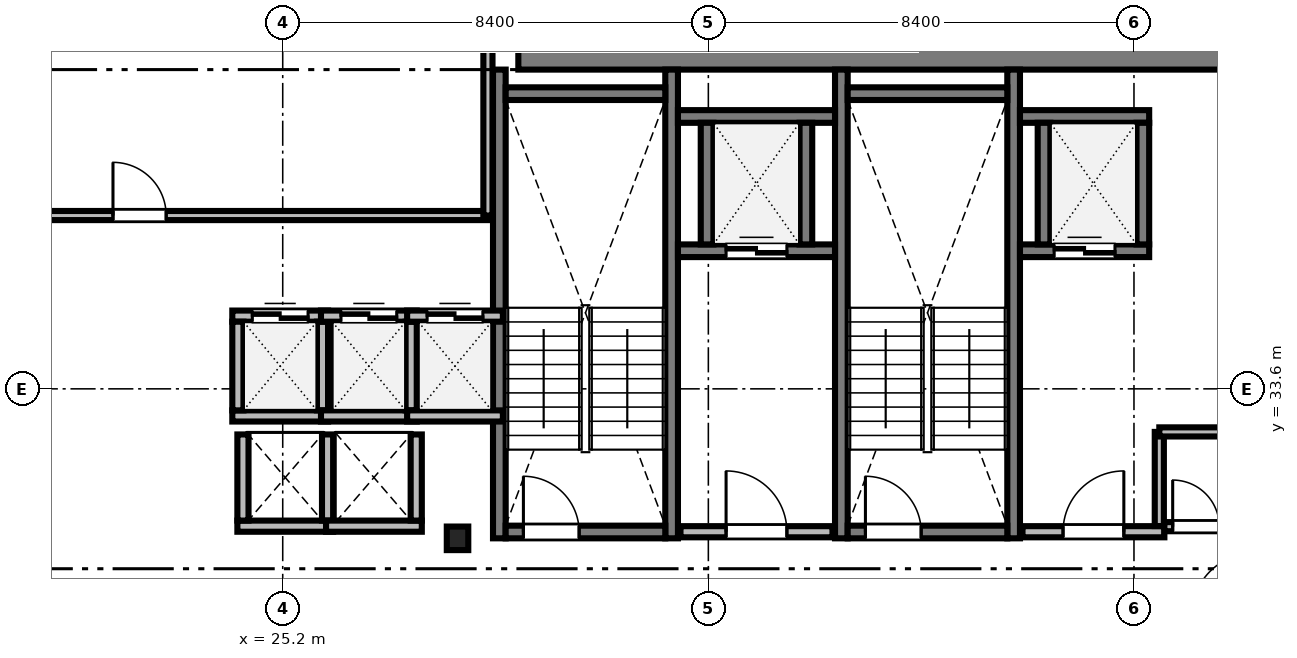
"""IFC4 building model, lengths in metres.
Left out: names, types, materials, properties, quantities, classifications, styles, units other than length and angle.
Written with IfcOpenShell. Run it as: python <this file> out.ifc"""

import sys

from ifc_helpers import new_model, si_unit, direction, frame, frame_2d, origin, origin_2d, place, context, subcontext, project, spatial, rectangle, i_section, extrude, source, transform, mapped, element, fill, save


model = new_model("IFC4")
c1 = context("Model", 3, precision=1e-05, world=origin(), true_north=direction((0.0, 1.0)))
c2 = subcontext(c1, "Body", "Model", "MODEL_VIEW")
j1 = project(units=[si_unit("LENGTHUNIT", "METRE"), si_unit("PLANEANGLEUNIT", "RADIAN")], contexts=[c1])
p1 = place(None, origin())
s1 = spatial("IfcSite", under=j1, at=p1, CompositionType="ELEMENT")
p2 = place(p1, origin())
s2 = spatial("IfcBuilding", under=s1, at=p2, CompositionType="ELEMENT")
p3 = place(p2, frame((0.0, 0.0, 159.4)))
s3 = spatial("IfcBuildingStorey", under=s2, at=p3, CompositionType="ELEMENT", Elevation=159.4)
m1 = source(origin(), c2, "Body", "SweptSolid", [
    extrude(rectangle(XDim=17.52, YDim=0.8, at=frame_2d((8.76, 0.0))), origin(), (0.0, 0.0, 1.0), 3.46),
])
p4 = place(p3, frame((29.85, 40.3, 0.0), z_axis=(0.0, 0.0, 1.0), x_axis=(1.0, 0.0, 0.0)))
e1 = element("IfcWall", 1, at=p4, inside=s3, PredefinedType="SHEAR", context=c2, shape_type="MappedRepresentation", body=[
    mapped(m1, transform((0.0, 0.0, 0.0), scale=1.0)),
])
m2 = source(origin(), c2, "Body", "SweptSolid", [
    extrude(i_section(OverallWidth=0.424, OverallDepth=0.465, WebThickness=0.035, FlangeThickness=0.056, FilletRadius=0.015, at=origin_2d()), origin(), (0.0, 0.0, 1.0), 3.46),
])
p5 = place(p3, frame((28.65, 30.65, 0.0), z_axis=(0.0, 0.0, 1.0), x_axis=(1.0, 0.0, 0.0)))
e2 = element("IfcColumn", 2, at=p5, inside=s3, PredefinedType="COLUMN", context=c2, shape_type="MappedRepresentation", body=[
    mapped(m2, transform((0.0, 0.0, 0.0), scale=1.0)),
])
m3 = source(origin(), c2, "Body", "SweptSolid", [
    extrude(rectangle(XDim=9.25, YDim=0.25, at=frame_2d((4.625, 0.0))), origin(), (0.0, 0.0, 1.0), 3.5),
])
for number, where, z_axis, x_axis in (
    (3, (29.475, 30.65, 0.0), (0.0, 0.0, 1.0), (0.0, 1.0, 0.0)),
    (4, (32.875, 30.65, 0.0), (0.0, 0.0, 1.0), (0.0, 1.0, 0.0)),
):
    element("IfcWall", number, at=place(p3, frame(where, z_axis=z_axis, x_axis=x_axis)), inside=s3, PredefinedType="SOLIDWALL", context=c2, shape_type="MappedRepresentation", body=[
        mapped(m3, transform((0.0, 0.0, 0.0), scale=1.0)),
    ])
m4 = source(origin(), c2, "Body", "SweptSolid", [
    extrude(rectangle(XDim=3.15, YDim=0.25, at=frame_2d((1.575, 0.0))), origin(), (0.0, 0.0, 1.0), 3.5),
])
p6 = place(p3, frame((29.6, 39.425, 0.0), z_axis=(0.0, 0.0, 1.0), x_axis=(1.0, 0.0, 0.0)))
e5 = element("IfcWall", 5, at=p6, inside=s3, PredefinedType="SOLIDWALL", context=c2, shape_type="MappedRepresentation", body=[
    mapped(m4, transform((0.0, 0.0, 0.0), scale=1.0)),
])
p7 = place(p3, frame((29.6, 30.775, 0.0), z_axis=(0.0, 0.0, 1.0), x_axis=(1.0, 0.0, 0.0)))
e6 = element("IfcWall", 6, at=p7, inside=s3, PredefinedType="SOLIDWALL", context=c2, shape_type="MappedRepresentation", body=[
    mapped(m4, transform((0.0, 0.0, 0.0), scale=1.0)),
])
m5 = source(origin(), c2, "Body", "SweptSolid", [
    extrude(rectangle(XDim=1.1, YDim=2.2, at=frame_2d((0.55, 1.1))), frame((0.0, 0.135, 0.0), z_axis=(0.0, -1.0, 0.0), x_axis=(1.0, 0.0, 0.0)), (0.0, 0.0, 1.0), 0.27),
])
p8 = place(p7, frame((0.35, 0.0, 0.0)))
e7 = element("IfcOpeningElement", 7, at=p8, cuts=e6, PredefinedType="OPENING", context=c2, shape_type="MappedRepresentation", body=[
    mapped(m5, transform((0.0, 0.0, 0.0), scale=1.0)),
])
for number, where, z_axis, x_axis in (
    (8, (36.225, 30.65, 0.0), (0.0, 0.0, 1.0), (0.0, 1.0, 0.0)),
    (9, (39.625, 30.65, 0.0), (0.0, 0.0, 1.0), (0.0, 1.0, 0.0)),
):
    element("IfcWall", number, at=place(p3, frame(where, z_axis=z_axis, x_axis=x_axis)), inside=s3, PredefinedType="SOLIDWALL", context=c2, shape_type="MappedRepresentation", body=[
        mapped(m3, transform((0.0, 0.0, 0.0), scale=1.0)),
    ])
p9 = place(p3, frame((36.35, 39.425, 0.0), z_axis=(0.0, 0.0, 1.0), x_axis=(1.0, 0.0, 0.0)))
e10 = element("IfcWall", 10, at=p9, inside=s3, PredefinedType="SOLIDWALL", context=c2, shape_type="MappedRepresentation", body=[
    mapped(m4, transform((0.0, 0.0, 0.0), scale=1.0)),
])
p10 = place(p3, frame((36.35, 30.775, 0.0), z_axis=(0.0, 0.0, 1.0), x_axis=(1.0, 0.0, 0.0)))
e11 = element("IfcWall", 11, at=p10, inside=s3, PredefinedType="SOLIDWALL", context=c2, shape_type="MappedRepresentation", body=[
    mapped(m4, transform((0.0, 0.0, 0.0), scale=1.0)),
])
p11 = place(p10, frame((0.35, 0.0, 0.0)))
e12 = element("IfcOpeningElement", 12, at=p11, cuts=e11, PredefinedType="OPENING", context=c2, shape_type="MappedRepresentation", body=[
    mapped(m5, transform((0.0, 0.0, 0.0), scale=1.0)),
])
m6 = source(origin(), c2, "Body", "SweptSolid", [
    extrude(rectangle(XDim=3.0, YDim=0.22, at=frame_2d((1.5, 0.0))), origin(), (0.0, 0.0, 1.0), 3.46),
])
p12 = place(p3, frame((33.05, 30.78, 0.0), z_axis=(0.0, 0.0, 1.0), x_axis=(1.0, 0.0, 0.0)))
e13 = element("IfcWall", 13, at=p12, inside=s3, PredefinedType="SOLIDWALL", context=c2, shape_type="MappedRepresentation", body=[
    mapped(m6, transform((0.0, 0.0, 0.0), scale=1.0)),
])
m7 = source(origin(), c2, "Body", "SweptSolid", [
    extrude(rectangle(XDim=1.2, YDim=2.2, at=frame_2d((0.6, 1.1))), frame((0.0, 0.12, 0.0), z_axis=(0.0, -1.0, 0.0), x_axis=(1.0, 0.0, 0.0)), (0.0, 0.0, 1.0), 0.24),
])
p13 = place(p12, frame((0.9, 0.0, 0.0)))
e14 = element("IfcOpeningElement", 14, at=p13, cuts=e13, PredefinedType="OPENING", context=c2, shape_type="MappedRepresentation", body=[
    mapped(m7, transform((0.0, 0.0, 0.0), scale=1.0)),
])
m8 = source(origin(), c2, "Body", "SweptSolid", [
    extrude(rectangle(XDim=2.8, YDim=0.22, at=frame_2d((1.4, 0.0))), origin(), (0.0, 0.0, 1.0), 3.46),
])
p14 = place(p3, frame((39.8, 30.78, 0.0), z_axis=(0.0, 0.0, 1.0), x_axis=(1.0, 0.0, 0.0)))
e15 = element("IfcWall", 15, at=p14, inside=s3, PredefinedType="SOLIDWALL", context=c2, shape_type="MappedRepresentation", body=[
    mapped(m8, transform((0.0, 0.0, 0.0), scale=1.0)),
])
p15 = place(p14, frame((0.8, 0.0, 0.0)))
e16 = element("IfcOpeningElement", 16, at=p15, cuts=e15, PredefinedType="OPENING", context=c2, shape_type="MappedRepresentation", body=[
    mapped(m7, transform((0.0, 0.0, 0.0), scale=1.0)),
])
m9 = source(origin(), c2, "Body", "SweptSolid", [
    extrude(rectangle(XDim=1.89, YDim=0.22, at=frame_2d((0.945, 0.0))), origin(), (0.0, 0.0, 1.0), 3.46),
])
p16 = place(p3, frame((24.205, 33.065, 0.0), z_axis=(0.0, 0.0, 1.0), x_axis=(1.0, 0.0, 0.0)))
e17 = element("IfcWall", 17, at=p16, inside=s3, PredefinedType="SOLIDWALL", context=c2, shape_type="MappedRepresentation", body=[
    mapped(m9, transform((0.0, 0.0, 0.0), scale=1.0)),
])
p17 = place(p3, frame((24.205, 35.035, 0.0), z_axis=(0.0, 0.0, 1.0), x_axis=(1.0, 0.0, 0.0)))
e18 = element("IfcWall", 18, at=p17, inside=s3, PredefinedType="SOLIDWALL", context=c2, shape_type="MappedRepresentation", body=[
    mapped(m9, transform((0.0, 0.0, 0.0), scale=1.0)),
])
m10 = source(origin(), c2, "Body", "SweptSolid", [
    extrude(rectangle(XDim=1.1, YDim=2.2, at=frame_2d((0.55, 1.1))), frame((0.0, 0.12, 0.0), z_axis=(0.0, -1.0, 0.0), x_axis=(1.0, 0.0, 0.0)), (0.0, 0.0, 1.0), 0.24),
])
p18 = place(p17, frame((0.395, 0.0, 0.0)))
e19 = element("IfcOpeningElement", 19, at=p18, cuts=e18, PredefinedType="OPENING", context=c2, shape_type="MappedRepresentation", body=[
    mapped(m10, transform((0.0, 0.0, 0.0), scale=1.0)),
])
m11 = source(origin(), c2, "Body", "SweptSolid", [
    extrude(rectangle(XDim=1.75, YDim=0.22, at=frame_2d((0.875, 0.0))), origin(), (0.0, 0.0, 1.0), 3.46),
])
for number, where, z_axis, x_axis in (
    (20, (24.315, 33.175, 0.0), (0.0, 0.0, 1.0), (0.0, 1.0, 0.0)),
    (21, (25.985, 33.175, 0.0), (0.0, 0.0, 1.0), (0.0, 1.0, 0.0)),
):
    element("IfcWall", number, at=place(p3, frame(where, z_axis=z_axis, x_axis=x_axis)), inside=s3, PredefinedType="SOLIDWALL", context=c2, shape_type="MappedRepresentation", body=[
        mapped(m11, transform((0.0, 0.0, 0.0), scale=1.0)),
    ])
p19 = place(p3, frame((25.955, 33.065, 0.0), z_axis=(0.0, 0.0, 1.0), x_axis=(1.0, 0.0, 0.0)))
e22 = element("IfcWall", 22, at=p19, inside=s3, PredefinedType="SOLIDWALL", context=c2, shape_type="MappedRepresentation", body=[
    mapped(m9, transform((0.0, 0.0, 0.0), scale=1.0)),
])
p20 = place(p3, frame((25.955, 35.035, 0.0), z_axis=(0.0, 0.0, 1.0), x_axis=(1.0, 0.0, 0.0)))
e23 = element("IfcWall", 23, at=p20, inside=s3, PredefinedType="SOLIDWALL", context=c2, shape_type="MappedRepresentation", body=[
    mapped(m9, transform((0.0, 0.0, 0.0), scale=1.0)),
])
p21 = place(p20, frame((0.395, 0.0, 0.0)))
e24 = element("IfcOpeningElement", 24, at=p21, cuts=e23, PredefinedType="OPENING", context=c2, shape_type="MappedRepresentation", body=[
    mapped(m10, transform((0.0, 0.0, 0.0), scale=1.0)),
])
p22 = place(p3, frame((27.735, 33.175, 0.0), z_axis=(0.0, 0.0, 1.0), x_axis=(0.0, 1.0, 0.0)))
e25 = element("IfcWall", 25, at=p22, inside=s3, PredefinedType="SOLIDWALL", context=c2, shape_type="MappedRepresentation", body=[
    mapped(m11, transform((0.0, 0.0, 0.0), scale=1.0)),
])
p23 = place(p3, frame((27.655, 33.065, 0.0), z_axis=(0.0, 0.0, 1.0), x_axis=(1.0, 0.0, 0.0)))
e26 = element("IfcWall", 26, at=p23, inside=s3, PredefinedType="SOLIDWALL", context=c2, shape_type="MappedRepresentation", body=[
    mapped(m9, transform((0.0, 0.0, 0.0), scale=1.0)),
])
p24 = place(p3, frame((27.655, 35.035, 0.0), z_axis=(0.0, 0.0, 1.0), x_axis=(1.0, 0.0, 0.0)))
e27 = element("IfcWall", 27, at=p24, inside=s3, PredefinedType="SOLIDWALL", context=c2, shape_type="MappedRepresentation", body=[
    mapped(m9, transform((0.0, 0.0, 0.0), scale=1.0)),
])
p25 = place(p24, frame((0.395, 0.0, 0.0)))
e28 = element("IfcOpeningElement", 28, at=p25, cuts=e27, PredefinedType="OPENING", context=c2, shape_type="MappedRepresentation", body=[
    mapped(m10, transform((0.0, 0.0, 0.0), scale=1.0)),
])
m12 = source(origin(), c2, "Body", "SweptSolid", [
    extrude(rectangle(XDim=3.1, YDim=0.25, at=frame_2d((1.55, 0.0))), origin(), (0.0, 0.0, 1.0), 3.46),
])
p26 = place(p3, frame((33.0, 36.325, 0.0), z_axis=(0.0, 0.0, 1.0), x_axis=(1.0, 0.0, 0.0)))
e29 = element("IfcWall", 29, at=p26, inside=s3, PredefinedType="SOLIDWALL", context=c2, shape_type="MappedRepresentation", body=[
    mapped(m12, transform((0.0, 0.0, 0.0), scale=1.0)),
])
m13 = source(origin(), c2, "Body", "SweptSolid", [
    extrude(rectangle(XDim=1.2, YDim=2.25, at=frame_2d((0.6, 1.125))), frame((0.0, 0.135, 0.0), z_axis=(0.0, -1.0, 0.0), x_axis=(1.0, 0.0, 0.0)), (0.0, 0.0, 1.0), 0.27),
])
p27 = place(p26, frame((0.95, 0.0, 0.0)))
e30 = element("IfcOpeningElement", 30, at=p27, cuts=e29, PredefinedType="OPENING", context=c2, shape_type="MappedRepresentation", body=[
    mapped(m13, transform((0.0, 0.0, 0.0), scale=1.0)),
])
p28 = place(p3, frame((33.0, 38.975, 0.0), z_axis=(0.0, 0.0, 1.0), x_axis=(1.0, 0.0, 0.0)))
e31 = element("IfcWall", 31, at=p28, inside=s3, PredefinedType="SOLIDWALL", context=c2, shape_type="MappedRepresentation", body=[
    mapped(m12, transform((0.0, 0.0, 0.0), scale=1.0)),
])
m14 = source(origin(), c2, "Body", "SweptSolid", [
    extrude(rectangle(XDim=2.4, YDim=0.25, at=frame_2d((1.2, 0.0))), origin(), (0.0, 0.0, 1.0), 3.46),
])
for number, where, z_axis, x_axis in (
    (32, (33.575, 36.45, 0.0), (0.0, 0.0, 1.0), (0.0, 1.0, 0.0)),
    (33, (35.525, 36.45, 0.0), (0.0, 0.0, 1.0), (0.0, 1.0, 0.0)),
):
    element("IfcWall", number, at=place(p3, frame(where, z_axis=z_axis, x_axis=x_axis)), inside=s3, PredefinedType="SOLIDWALL", context=c2, shape_type="MappedRepresentation", body=[
        mapped(m14, transform((0.0, 0.0, 0.0), scale=1.0)),
    ])
m15 = source(origin(), c2, "Body", "SweptSolid", [
    extrude(rectangle(XDim=2.55, YDim=0.25, at=frame_2d((1.275, 0.0))), origin(), (0.0, 0.0, 1.0), 3.46),
])
p29 = place(p3, frame((39.75, 36.325, 0.0), z_axis=(0.0, 0.0, 1.0), x_axis=(1.0, 0.0, 0.0)))
e34 = element("IfcWall", 34, at=p29, inside=s3, PredefinedType="SOLIDWALL", context=c2, shape_type="MappedRepresentation", body=[
    mapped(m15, transform((0.0, 0.0, 0.0), scale=1.0)),
])
p30 = place(p29, frame((0.675, 0.0, 0.0)))
e35 = element("IfcOpeningElement", 35, at=p30, cuts=e34, PredefinedType="OPENING", context=c2, shape_type="MappedRepresentation", body=[
    mapped(m13, transform((0.0, 0.0, 0.0), scale=1.0)),
])
p31 = place(p3, frame((39.75, 38.975, 0.0), z_axis=(0.0, 0.0, 1.0), x_axis=(1.0, 0.0, 0.0)))
e36 = element("IfcWall", 36, at=p31, inside=s3, PredefinedType="SOLIDWALL", context=c2, shape_type="MappedRepresentation", body=[
    mapped(m15, transform((0.0, 0.0, 0.0), scale=1.0)),
])
for number, where, z_axis, x_axis in (
    (37, (40.225, 36.45, 0.0), (0.0, 0.0, 1.0), (0.0, 1.0, 0.0)),
    (38, (42.175, 36.45, 0.0), (0.0, 0.0, 1.0), (0.0, 1.0, 0.0)),
):
    element("IfcWall", number, at=place(p3, frame(where, z_axis=z_axis, x_axis=x_axis)), inside=s3, PredefinedType="SOLIDWALL", context=c2, shape_type="MappedRepresentation", body=[
        mapped(m14, transform((0.0, 0.0, 0.0), scale=1.0)),
    ])
m16 = source(origin(), c2, "Body", "SweptSolid", [
    extrude(rectangle(XDim=1.89, YDim=0.22, at=frame_2d((0.945, 0.0))), origin(), (0.0, 0.0, 1.0), 3.46),
])
p32 = place(p3, frame((24.305, 30.89, 0.0), z_axis=(0.0, 0.0, 1.0), x_axis=(1.0, 0.0, 0.0)))
e39 = element("IfcWall", 39, at=p32, inside=s3, PredefinedType="SOLIDWALL", context=c2, shape_type="MappedRepresentation", body=[
    mapped(m16, transform((0.0, 0.0, 0.0), scale=1.0)),
])
m17 = source(origin(), c2, "Body", "SweptSolid", [
    extrude(rectangle(XDim=1.7, YDim=0.22, at=frame_2d((0.85, 0.0))), origin(), (0.0, 0.0, 1.0), 3.46),
])
for number, where, z_axis, x_axis in (
    (40, (24.415, 31.0, 0.0), (0.0, 0.0, 1.0), (0.0, 1.0, 0.0)),
    (41, (26.085, 31.0, 0.0), (0.0, 0.0, 1.0), (0.0, 1.0, 0.0)),
):
    element("IfcWall", number, at=place(p3, frame(where, z_axis=z_axis, x_axis=x_axis)), inside=s3, PredefinedType="SOLIDWALL", context=c2, shape_type="MappedRepresentation", body=[
        mapped(m17, transform((0.0, 0.0, 0.0), scale=1.0)),
    ])
p33 = place(p3, frame((26.055, 30.89, 0.0), z_axis=(0.0, 0.0, 1.0), x_axis=(1.0, 0.0, 0.0)))
e42 = element("IfcWall", 42, at=p33, inside=s3, PredefinedType="SOLIDWALL", context=c2, shape_type="MappedRepresentation", body=[
    mapped(m16, transform((0.0, 0.0, 0.0), scale=1.0)),
])
p34 = place(p3, frame((27.835, 31.0, 0.0), z_axis=(0.0, 0.0, 1.0), x_axis=(0.0, 1.0, 0.0)))
e43 = element("IfcWall", 43, at=p34, inside=s3, PredefinedType="SOLIDWALL", context=c2, shape_type="MappedRepresentation", body=[
    mapped(m17, transform((0.0, 0.0, 0.0), scale=1.0)),
])
m18 = source(origin(), c2, "Body", "SweptSolid", [
    extrude(rectangle(XDim=22.328, YDim=0.18, at=frame_2d((11.164, 0.0))), origin(), (0.0, 0.0, 1.0), 2.702),
])
p35 = place(p3, frame((6.922, 37.02, 0.0), z_axis=(0.0, 0.0, 1.0), x_axis=(1.0, 0.0, 0.0)))
e44 = element("IfcWall", 44, at=p35, inside=s3, PredefinedType="PARTITIONING", context=c2, shape_type="MappedRepresentation", body=[
    mapped(m18, transform((0.0, 0.0, 0.0), scale=1.0)),
])
m19 = source(origin(), c2, "Body", "SweptSolid", [
    extrude(rectangle(XDim=1.05, YDim=2.2, at=frame_2d((0.525, 1.1))), frame((0.0, 0.1, 0.0), z_axis=(0.0, -1.0, 0.0), x_axis=(1.0, 0.0, 0.0)), (0.0, 0.0, 1.0), 0.2),
])
p36 = place(p35, frame((14.928, 0.0, 0.0)))
e45 = element("IfcOpeningElement", 45, at=p36, cuts=e44, PredefinedType="OPENING", context=c2, shape_type="MappedRepresentation", body=[
    mapped(m19, transform((0.0, 0.0, 0.0), scale=1.0)),
])
m20 = source(origin(), c2, "Body", "SweptSolid", [
    extrude(rectangle(XDim=1.248, YDim=0.18, at=frame_2d((0.624, 0.0))), origin(), (0.0, 0.0, 1.0), 3.46),
])
p37 = place(p3, frame((42.6, 30.88, 0.0), z_axis=(0.0, 0.0, 1.0), x_axis=(1.0, 0.0, 0.0)))
e46 = element("IfcWall", 46, at=p37, inside=s3, PredefinedType="PARTITIONING", context=c2, shape_type="MappedRepresentation", body=[
    mapped(m20, transform((0.0, 0.0, 0.0), scale=1.0)),
])
m21 = source(origin(), c2, "Body", "SweptSolid", [
    extrude(rectangle(XDim=0.92, YDim=2.1, at=frame_2d((0.46, 1.05))), frame((0.0, 0.1, 0.0), z_axis=(0.0, -1.0, 0.0), x_axis=(1.0, 0.0, 0.0)), (0.0, 0.0, 1.0), 0.2),
])
p38 = place(p37, frame((0.164, 0.0, 0.0)))
e47 = element("IfcOpeningElement", 47, at=p38, cuts=e46, PredefinedType="OPENING", context=c2, shape_type="MappedRepresentation", body=[
    mapped(m21, transform((0.0, 0.0, 0.0), scale=1.0)),
])
m22 = source(origin(), c2, "Body", "SweptSolid", [
    extrude(rectangle(XDim=11.45, YDim=0.18, at=frame_2d((5.725, 0.0))), origin(), (0.0, 0.0, 1.0), 2.702),
])
p39 = place(p3, frame((29.25, 37.02, 0.0), z_axis=(0.0, 0.0, 1.0), x_axis=(0.0, 1.0, 0.0)))
e48 = element("IfcWall", 48, at=p39, inside=s3, PredefinedType="PARTITIONING", context=c2, shape_type="MappedRepresentation", body=[
    mapped(m22, transform((0.0, 0.0, 0.0), scale=1.0)),
])
m23 = source(origin(), c2, "Body", "SweptSolid", [
    extrude(rectangle(XDim=1.858, YDim=0.18, at=frame_2d((0.929, 0.0))), origin(), (0.0, 0.0, 1.0), 3.46),
])
p40 = place(p3, frame((42.5, 30.892, 0.0), z_axis=(0.0, 0.0, 1.0), x_axis=(0.0, 1.0, 0.0)))
e49 = element("IfcWall", 49, at=p40, inside=s3, PredefinedType="PARTITIONING", context=c2, shape_type="MappedRepresentation", body=[
    mapped(m23, transform((0.0, 0.0, 0.0), scale=1.0)),
])
m24 = source(origin(), c2, "Body", "SweptSolid", [
    extrude(rectangle(XDim=1.348, YDim=0.18, at=frame_2d((0.674, 0.0))), origin(), (0.0, 0.0, 1.0), 3.46),
])
p41 = place(p3, frame((42.5, 32.75, 0.0), z_axis=(0.0, 0.0, 1.0), x_axis=(1.0, 0.0, 0.0)))
e50 = element("IfcWall", 50, at=p41, inside=s3, PredefinedType="PARTITIONING", context=c2, shape_type="MappedRepresentation", body=[
    mapped(m24, transform((0.0, 0.0, 0.0), scale=1.0)),
])
m25 = source(origin(), c2, "Body", "SweptSolid", [
    extrude(rectangle(XDim=1.1, YDim=2.2, at=frame_2d((0.55, 1.1))), frame((0.0, 0.025, 0.0), z_axis=(0.0, -1.0, 0.0), x_axis=(1.0, 0.0, 0.0)), (0.0, 0.0, 1.0), 0.05),
])
p42 = place(p8, origin())
e51 = element("IfcDoor", 51, at=p42, inside=s3, OperationType="SINGLE_SWING_LEFT", PredefinedType="DOOR", context=c2, shape_type="MappedRepresentation", body=[
    mapped(m25, transform((0.0, 0.0, 0.0), scale=1.0)),
])
fill(e7, e51)
p43 = place(p11, origin())
e52 = element("IfcDoor", 52, at=p43, inside=s3, OperationType="SINGLE_SWING_LEFT", PredefinedType="DOOR", context=c2, shape_type="MappedRepresentation", body=[
    mapped(m25, transform((0.0, 0.0, 0.0), scale=1.0)),
])
fill(e12, e52)
m26 = source(origin(), c2, "Body", "SweptSolid", [
    extrude(rectangle(XDim=1.2, YDim=2.2, at=frame_2d((0.6, 1.1))), frame((0.0, 0.025, 0.0), z_axis=(0.0, -1.0, 0.0), x_axis=(1.0, 0.0, 0.0)), (0.0, 0.0, 1.0), 0.05),
])
p44 = place(p13, origin())
e53 = element("IfcDoor", 53, at=p44, inside=s3, OperationType="SINGLE_SWING_LEFT", PredefinedType="DOOR", context=c2, shape_type="MappedRepresentation", body=[
    mapped(m26, transform((0.0, 0.0, 0.0), scale=1.0)),
])
fill(e14, e53)
p45 = place(p15, origin())
e54 = element("IfcDoor", 54, at=p45, inside=s3, OperationType="SINGLE_SWING_RIGHT", PredefinedType="DOOR", context=c2, shape_type="MappedRepresentation", body=[
    mapped(m26, transform((0.0, 0.0, 0.0), scale=1.0)),
])
fill(e16, e54)
p46 = place(p18, origin())
e55 = element("IfcDoor", 55, at=p46, inside=s3, OperationType="DOUBLE_DOOR_SLIDING", PredefinedType="DOOR", context=c2, shape_type="MappedRepresentation", body=[
    mapped(m25, transform((0.0, 0.0, 0.0), scale=1.0)),
])
fill(e19, e55)
p47 = place(p21, origin())
e56 = element("IfcDoor", 56, at=p47, inside=s3, OperationType="DOUBLE_DOOR_SLIDING", PredefinedType="DOOR", context=c2, shape_type="MappedRepresentation", body=[
    mapped(m25, transform((0.0, 0.0, 0.0), scale=1.0)),
])
fill(e24, e56)
p48 = place(p25, origin())
e57 = element("IfcDoor", 57, at=p48, inside=s3, OperationType="DOUBLE_DOOR_SLIDING", PredefinedType="DOOR", context=c2, shape_type="MappedRepresentation", body=[
    mapped(m25, transform((0.0, 0.0, 0.0), scale=1.0)),
])
fill(e28, e57)
m27 = source(origin(), c2, "Body", "SweptSolid", [
    extrude(rectangle(XDim=1.2, YDim=2.25, at=frame_2d((0.6, 1.125))), frame((0.0, 0.025, 0.0), z_axis=(0.0, -1.0, 0.0), x_axis=(1.0, 0.0, 0.0)), (0.0, 0.0, 1.0), 0.05),
])
p49 = place(p27, origin())
e58 = element("IfcDoor", 58, at=p49, inside=s3, OperationType="DOUBLE_DOOR_SLIDING", PredefinedType="DOOR", context=c2, shape_type="MappedRepresentation", body=[
    mapped(m27, transform((0.0, 0.0, 0.0), scale=1.0)),
])
fill(e30, e58)
p50 = place(p30, origin())
e59 = element("IfcDoor", 59, at=p50, inside=s3, OperationType="DOUBLE_DOOR_SLIDING", PredefinedType="DOOR", context=c2, shape_type="MappedRepresentation", body=[
    mapped(m27, transform((0.0, 0.0, 0.0), scale=1.0)),
])
fill(e35, e59)
m28 = source(origin(), c2, "Body", "SweptSolid", [
    extrude(rectangle(XDim=1.05, YDim=2.2, at=frame_2d((0.525, 1.1))), frame((0.0, 0.025, 0.0), z_axis=(0.0, -1.0, 0.0), x_axis=(1.0, 0.0, 0.0)), (0.0, 0.0, 1.0), 0.05),
])
p51 = place(p36, origin())
e60 = element("IfcDoor", 60, at=p51, inside=s3, OperationType="SINGLE_SWING_LEFT", PredefinedType="DOOR", context=c2, shape_type="MappedRepresentation", body=[
    mapped(m28, transform((0.0, 0.0, 0.0), scale=1.0)),
])
fill(e45, e60)
m29 = source(origin(), c2, "Body", "SweptSolid", [
    extrude(rectangle(XDim=0.92, YDim=2.1, at=frame_2d((0.46, 1.05))), frame((0.0, 0.025, 0.0), z_axis=(0.0, -1.0, 0.0), x_axis=(1.0, 0.0, 0.0)), (0.0, 0.0, 1.0), 0.05),
])
p52 = place(p38, origin())
e61 = element("IfcDoor", 61, at=p52, inside=s3, OperationType="SINGLE_SWING_LEFT", PredefinedType="DOOR", context=c2, shape_type="MappedRepresentation", body=[
    mapped(m29, transform((0.0, 0.0, 0.0), scale=1.0)),
])
fill(e47, e61)
save(model, sys.argv[1])
